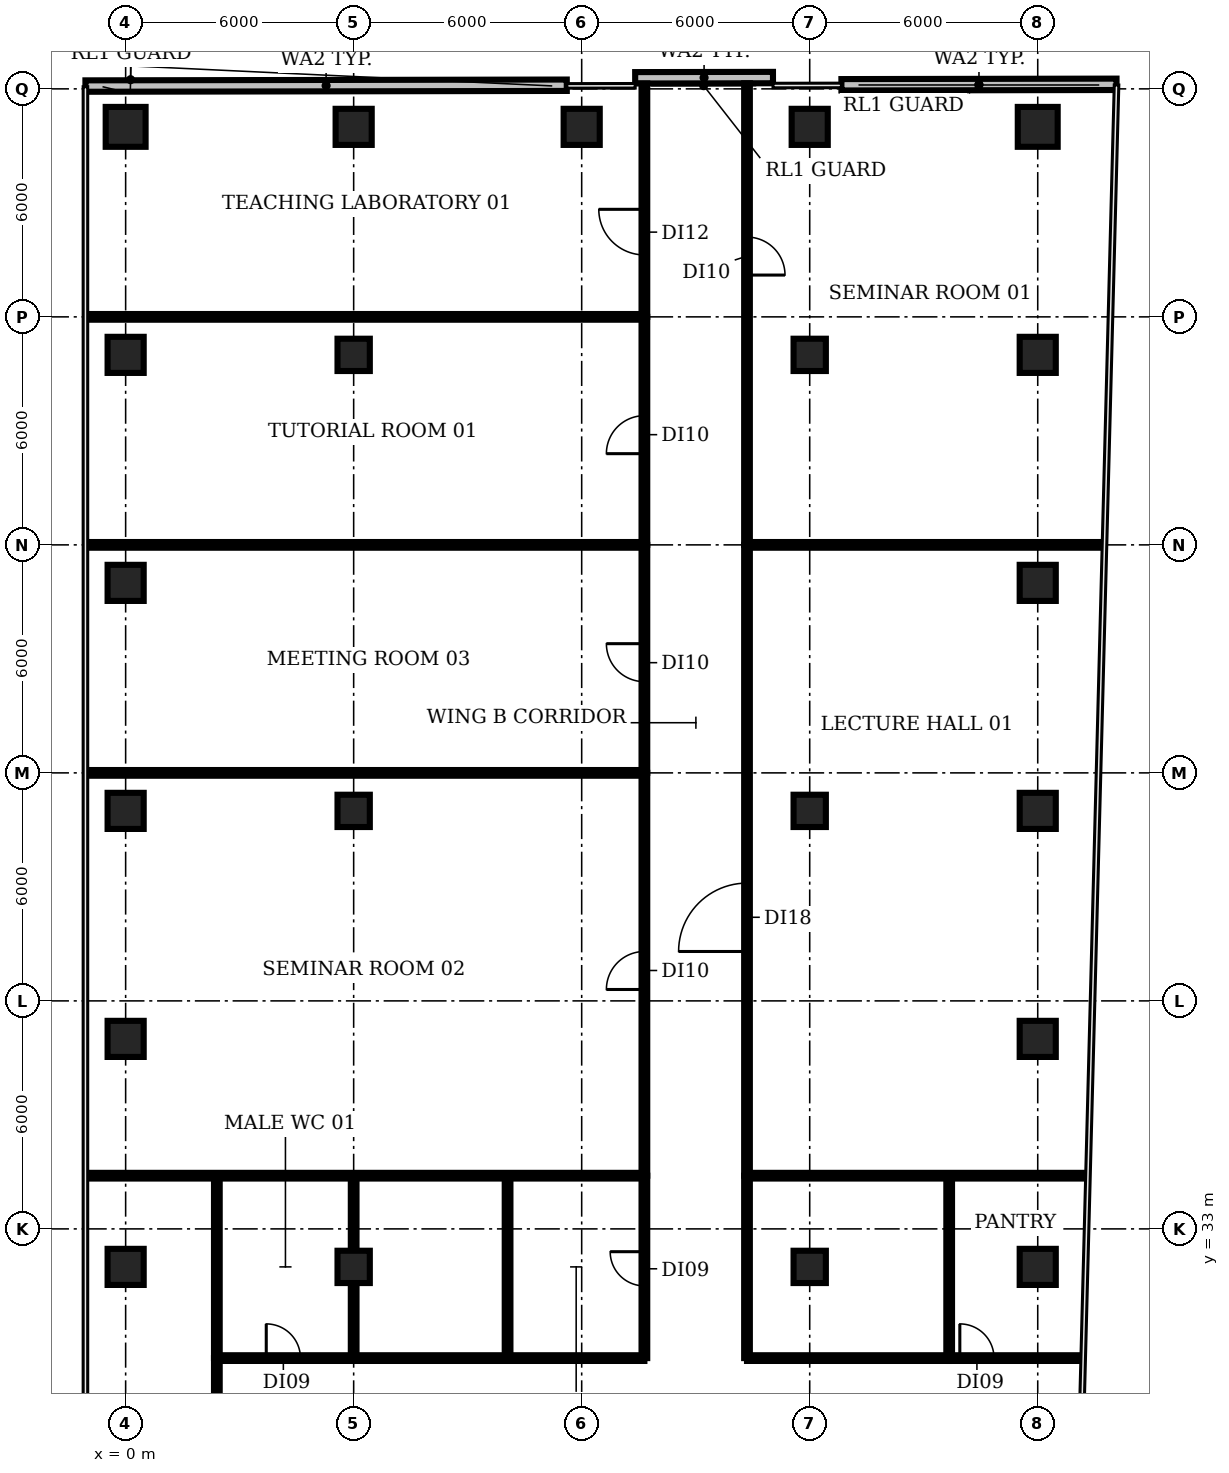
"""IFC4 building model, lengths in metres.
Left out: names, types, materials, properties, quantities, classifications, styles, units other than length and angle.
Written with IfcOpenShell. Run it as: python <this file> out.ifc"""

import sys

from ifc_helpers import new_model, si_unit, direction, frame, frame_2d, origin, origin_2d, place, context, subcontext, project, spatial, rectangle, circle, extrude, element, fill, save


model = new_model("IFC4")
c1 = context("Model", 3, precision=1e-05, world=origin(), true_north=direction((0.0, 1.0)))
c2 = subcontext(c1, "Body", "Model", "MODEL_VIEW")
j1 = project(units=[si_unit("LENGTHUNIT", "METRE"), si_unit("PLANEANGLEUNIT", "RADIAN")], contexts=[c1])
p1 = place(None, origin())
s1 = spatial("IfcSite", under=j1, at=p1, CompositionType="ELEMENT")
p2 = place(p1, origin())
s2 = spatial("IfcBuilding", under=s1, at=p2, CompositionType="ELEMENT")
p3 = place(p2, frame((0.0, 0.0, 45.8)))
s3 = spatial("IfcBuildingStorey", under=s2, at=p3, CompositionType="ELEMENT", Elevation=45.8)
for number, where, z_axis, x_axis in (
    (1, (0.0, 32.0, 0.0), (0.0, 0.0, 1.0), (1.0, 0.0, 0.0)),
    (2, (0.0, 38.0, 0.0), (0.0, 0.0, 1.0), (1.0, 0.0, 0.0)),
    (3, (0.0, 44.0, 0.0), (0.0, 0.0, 1.0), (1.0, 0.0, 0.0)),
    (4, (0.0, 50.0, 0.0), (0.0, 0.0, 1.0), (1.0, 0.0, 0.0)),
    (5, (0.0, 56.0, 0.0), (0.0, 0.0, 1.0), (1.0, 0.0, 0.0)),
):
    element("IfcColumn", number, at=place(p3, frame(where, z_axis=z_axis, x_axis=x_axis)), inside=s3, PredefinedType="COLUMN", context=c2, shape_type="SweptSolid", body=[
        extrude(rectangle(XDim=0.95, YDim=0.95, at=origin_2d()), origin(), (0.0, 0.0, 1.0), 3.85),
    ])
p4 = place(p3, frame((0.0, 62.0, 0.0), z_axis=(0.0, 0.0, 1.0), x_axis=(1.0, 0.0, 0.0)))
e6 = element("IfcColumn", 6, at=p4, inside=s3, PredefinedType="COLUMN", context=c2, shape_type="SweptSolid", body=[
    extrude(circle(Radius=0.525, at=origin_2d()), origin(), (0.0, 0.0, 1.0), 3.85),
])
for number, where, z_axis, x_axis in (
    (7, (6.0, 32.0, 0.0), (0.0, 0.0, 1.0), (1.0, 0.0, 0.0)),
    (8, (6.0, 44.0, 0.0), (0.0, 0.0, 1.0), (1.0, 0.0, 0.0)),
    (9, (6.0, 56.0, 0.0), (0.0, 0.0, 1.0), (1.0, 0.0, 0.0)),
):
    element("IfcColumn", number, at=place(p3, frame(where, z_axis=z_axis, x_axis=x_axis)), inside=s3, PredefinedType="COLUMN", context=c2, shape_type="SweptSolid", body=[
        extrude(rectangle(XDim=0.85, YDim=0.85, at=origin_2d()), origin(), (0.0, 0.0, 1.0), 3.85),
    ])
for number, where, z_axis, x_axis in (
    (10, (6.0, 62.0, 0.0), (0.0, 0.0, 1.0), (1.0, 0.0, 0.0)),
    (11, (12.0, 62.0, 0.0), (0.0, 0.0, 1.0), (1.0, 0.0, 0.0)),
):
    element("IfcColumn", number, at=place(p3, frame(where, z_axis=z_axis, x_axis=x_axis)), inside=s3, PredefinedType="COLUMN", context=c2, shape_type="SweptSolid", body=[
        extrude(rectangle(XDim=0.95, YDim=0.95, at=origin_2d()), origin(), (0.0, 0.0, 1.0), 3.85),
    ])
for number, where, z_axis, x_axis in (
    (12, (18.0, 32.0, 0.0), (0.0, 0.0, 1.0), (1.0, 0.0, 0.0)),
    (13, (18.0, 44.0, 0.0), (0.0, 0.0, 1.0), (1.0, 0.0, 0.0)),
    (14, (18.0, 56.0, 0.0), (0.0, 0.0, 1.0), (1.0, 0.0, 0.0)),
):
    element("IfcColumn", number, at=place(p3, frame(where, z_axis=z_axis, x_axis=x_axis)), inside=s3, PredefinedType="COLUMN", context=c2, shape_type="SweptSolid", body=[
        extrude(rectangle(XDim=0.85, YDim=0.85, at=origin_2d()), origin(), (0.0, 0.0, 1.0), 3.85),
    ])
for number, where, z_axis, x_axis in (
    (15, (18.0, 62.0, 0.0), (0.0, 0.0, 1.0), (1.0, 0.0, 0.0)),
    (16, (24.0, 32.0, 0.0), (0.0, 0.0, 1.0), (1.0, 0.0, 0.0)),
    (17, (24.0, 38.0, 0.0), (0.0, 0.0, 1.0), (1.0, 0.0, 0.0)),
    (18, (24.0, 44.0, 0.0), (0.0, 0.0, 1.0), (1.0, 0.0, 0.0)),
    (19, (24.0, 50.0, 0.0), (0.0, 0.0, 1.0), (1.0, 0.0, 0.0)),
    (20, (24.0, 56.0, 0.0), (0.0, 0.0, 1.0), (1.0, 0.0, 0.0)),
):
    element("IfcColumn", number, at=place(p3, frame(where, z_axis=z_axis, x_axis=x_axis)), inside=s3, PredefinedType="COLUMN", context=c2, shape_type="SweptSolid", body=[
        extrude(rectangle(XDim=0.95, YDim=0.95, at=origin_2d()), origin(), (0.0, 0.0, 1.0), 3.85),
    ])
p5 = place(p3, frame((24.0, 62.0, 0.0), z_axis=(0.0, 0.0, 1.0), x_axis=(1.0, 0.0, 0.0)))
e21 = element("IfcColumn", 21, at=p5, inside=s3, PredefinedType="COLUMN", context=c2, shape_type="SweptSolid", body=[
    extrude(circle(Radius=0.525, at=origin_2d()), origin(), (0.0, 0.0, 1.0), 3.85),
])
p6 = place(p3, frame((26.074, 63.12, 0.0), z_axis=(0.0, 0.0, 1.0), x_axis=(-0.999998578418, -0.001686167636, 0.0)))
e22 = element("IfcWall", 22, at=p6, inside=s3, PredefinedType="SOLIDWALL", context=c2, shape_type="SweptSolid", body=[
    extrude(rectangle(XDim=7.24, YDim=0.3, at=frame_2d((3.62, 0.0))), origin(), (0.0, 0.0, 1.0), 3.85),
])
p7 = place(p3, frame((17.034, 63.297, 0.0), z_axis=(0.0, 0.0, 1.0), x_axis=(-0.999998583486, -0.001683159267, 0.0)))
e23 = element("IfcWall", 23, at=p7, inside=s3, PredefinedType="SOLIDWALL", context=c2, shape_type="SweptSolid", body=[
    extrude(rectangle(XDim=3.626, YDim=0.3, at=frame_2d((1.813, 0.0))), origin(), (0.0, 0.0, 1.0), 3.85),
])
p8 = place(p3, frame((11.608, 63.095, 0.0), z_axis=(0.0, 0.0, 1.0), x_axis=(-0.999998561418, -0.001696219611, 0.0)))
e24 = element("IfcWall", 24, at=p8, inside=s3, PredefinedType="SOLIDWALL", context=c2, shape_type="SweptSolid", body=[
    extrude(rectangle(XDim=12.666, YDim=0.3, at=frame_2d((6.333, 0.0))), origin(), (0.0, 0.0, 1.0), 3.85),
])
for number, where, z_axis, x_axis in (
    (25, (-1.01, 34.4, 0.0), (0.0, 0.0, 1.0), (1.0, 0.0, 0.0)),
    (26, (-1.01, 45.0, 0.0), (0.0, 0.0, 1.0), (1.0, 0.0, 0.0)),
    (27, (-1.01, 51.0, 0.0), (0.0, 0.0, 1.0), (1.0, 0.0, 0.0)),
    (28, (-1.01, 57.0, 0.0), (0.0, 0.0, 1.0), (1.0, 0.0, 0.0)),
):
    element("IfcWall", number, at=place(p3, frame(where, z_axis=z_axis, x_axis=x_axis)), inside=s3, PredefinedType="PARTITIONING", context=c2, shape_type="SweptSolid", body=[
        extrude(rectangle(XDim=14.66, YDim=0.15, at=frame_2d((7.33, 0.0))), origin(), (0.0, 0.0, 1.0), 2.83),
    ])
p9 = place(p3, frame((2.4, 25.7, 0.0), z_axis=(0.0, 0.0, 1.0), x_axis=(0.0, 1.0, 0.0)))
e29 = element("IfcWall", 29, at=p9, inside=s3, PredefinedType="PARTITIONING", context=c2, shape_type="SweptSolid", body=[
    extrude(rectangle(XDim=3.9, YDim=0.15, at=frame_2d((1.95, 0.0))), origin(), (0.0, 0.0, 1.0), 2.83),
])
p10 = place(p3, frame((2.4, 29.6, 0.0), z_axis=(0.0, 0.0, 1.0), x_axis=(0.0, 1.0, 0.0)))
e30 = element("IfcWall", 30, at=p10, inside=s3, PredefinedType="PARTITIONING", context=c2, shape_type="SweptSolid", body=[
    extrude(rectangle(XDim=4.8, YDim=0.15, at=frame_2d((2.4, 0.0))), origin(), (0.0, 0.0, 1.0), 2.83),
])
p11 = place(p3, frame((2.4, 29.6, 0.0), z_axis=(0.0, 0.0, 1.0), x_axis=(1.0, 0.0, 0.0)))
e31 = element("IfcWall", 31, at=p11, inside=s3, PredefinedType="PARTITIONING", context=c2, shape_type="SweptSolid", body=[
    extrude(rectangle(XDim=3.6, YDim=0.15, at=frame_2d((1.8, 0.0))), origin(), (0.0, 0.0, 1.0), 2.83),
])
p12 = place(p11, frame((1.3, 0.0, 0.0)))
e32 = element("IfcOpeningElement", 32, at=p12, cuts=e31, PredefinedType="OPENING", context=c2, shape_type="SweptSolid", body=[
    extrude(rectangle(XDim=0.9, YDim=2.1, at=frame_2d((0.45, 1.05))), frame((0.0, 0.085, 0.0), z_axis=(0.0, -1.0, 0.0), x_axis=(1.0, 0.0, 0.0)), (0.0, 0.0, 1.0), 0.17),
])
p13 = place(p3, frame((6.0, 29.6, 0.0), z_axis=(0.0, 0.0, 1.0), x_axis=(0.0, 1.0, 0.0)))
e33 = element("IfcWall", 33, at=p13, inside=s3, PredefinedType="PARTITIONING", context=c2, shape_type="SweptSolid", body=[
    extrude(rectangle(XDim=4.8, YDim=0.15, at=frame_2d((2.4, 0.0))), origin(), (0.0, 0.0, 1.0), 2.83),
])
p14 = place(p3, frame((6.0, 29.6, 0.0), z_axis=(0.0, 0.0, 1.0), x_axis=(1.0, 0.0, 0.0)))
e34 = element("IfcWall", 34, at=p14, inside=s3, PredefinedType="PARTITIONING", context=c2, shape_type="SweptSolid", body=[
    extrude(rectangle(XDim=7.65, YDim=0.15, at=frame_2d((3.825, 0.0))), origin(), (0.0, 0.0, 1.0), 2.83),
])
p15 = place(p3, frame((10.05, 29.6, 0.0), z_axis=(0.0, 0.0, 1.0), x_axis=(0.0, 1.0, 0.0)))
e35 = element("IfcWall", 35, at=p15, inside=s3, PredefinedType="PARTITIONING", context=c2, shape_type="SweptSolid", body=[
    extrude(rectangle(XDim=4.8, YDim=0.15, at=frame_2d((2.4, 0.0))), origin(), (0.0, 0.0, 1.0), 2.83),
])
p16 = place(p3, frame((13.65, 29.6, 0.0), z_axis=(0.0, 0.0, 1.0), x_axis=(0.0, 1.0, 0.0)))
e36 = element("IfcWall", 36, at=p16, inside=s3, PredefinedType="PARTITIONING", context=c2, shape_type="SweptSolid", body=[
    extrude(rectangle(XDim=4.8, YDim=0.15, at=frame_2d((2.4, 0.0))), origin(), (0.0, 0.0, 1.0), 2.83),
])
p17 = place(p16, frame((1.9, 0.0, 0.0)))
e37 = element("IfcOpeningElement", 37, at=p17, cuts=e36, PredefinedType="OPENING", context=c2, shape_type="SweptSolid", body=[
    extrude(rectangle(XDim=0.9, YDim=2.1, at=frame_2d((0.45, 1.05))), frame((0.0, 0.085, 0.0), z_axis=(0.0, -1.0, 0.0), x_axis=(1.0, 0.0, 0.0)), (0.0, 0.0, 1.0), 0.17),
])
p18 = place(p3, frame((13.65, 34.4, 0.0), z_axis=(0.0, 0.0, 1.0), x_axis=(0.0, 1.0, 0.0)))
e38 = element("IfcWall", 38, at=p18, inside=s3, PredefinedType="PARTITIONING", context=c2, shape_type="SweptSolid", body=[
    extrude(rectangle(XDim=10.6, YDim=0.15, at=frame_2d((5.3, 0.0))), origin(), (0.0, 0.0, 1.0), 2.83),
])
p19 = place(p18, frame((4.9, 0.0, 0.0)))
e39 = element("IfcOpeningElement", 39, at=p19, cuts=e38, PredefinedType="OPENING", context=c2, shape_type="SweptSolid", body=[
    extrude(rectangle(XDim=1.0, YDim=2.1, at=frame_2d((0.5, 1.05))), frame((0.0, 0.085, 0.0), z_axis=(0.0, -1.0, 0.0), x_axis=(1.0, 0.0, 0.0)), (0.0, 0.0, 1.0), 0.17),
])
p20 = place(p3, frame((13.65, 45.0, 0.0), z_axis=(0.0, 0.0, 1.0), x_axis=(0.0, 1.0, 0.0)))
e40 = element("IfcWall", 40, at=p20, inside=s3, PredefinedType="PARTITIONING", context=c2, shape_type="SweptSolid", body=[
    extrude(rectangle(XDim=6.0, YDim=0.15, at=frame_2d((3.0, 0.0))), origin(), (0.0, 0.0, 1.0), 2.83),
])
p21 = place(p20, frame((2.4, 0.0, 0.0)))
e41 = element("IfcOpeningElement", 41, at=p21, cuts=e40, PredefinedType="OPENING", context=c2, shape_type="SweptSolid", body=[
    extrude(rectangle(XDim=1.0, YDim=2.1, at=frame_2d((0.5, 1.05))), frame((0.0, 0.085, 0.0), z_axis=(0.0, -1.0, 0.0), x_axis=(1.0, 0.0, 0.0)), (0.0, 0.0, 1.0), 0.17),
])
p22 = place(p3, frame((13.65, 51.0, 0.0), z_axis=(0.0, 0.0, 1.0), x_axis=(0.0, 1.0, 0.0)))
e42 = element("IfcWall", 42, at=p22, inside=s3, PredefinedType="PARTITIONING", context=c2, shape_type="SweptSolid", body=[
    extrude(rectangle(XDim=6.0, YDim=0.15, at=frame_2d((3.0, 0.0))), origin(), (0.0, 0.0, 1.0), 2.83),
])
p23 = place(p22, frame((2.4, 0.0, 0.0)))
e43 = element("IfcOpeningElement", 43, at=p23, cuts=e42, PredefinedType="OPENING", context=c2, shape_type="SweptSolid", body=[
    extrude(rectangle(XDim=1.0, YDim=2.1, at=frame_2d((0.5, 1.05))), frame((0.0, 0.085, 0.0), z_axis=(0.0, -1.0, 0.0), x_axis=(1.0, 0.0, 0.0)), (0.0, 0.0, 1.0), 0.17),
])
p24 = place(p3, frame((13.65, 57.0, 0.0), z_axis=(0.0, 0.0, 1.0), x_axis=(0.0, 1.0, 0.0)))
e44 = element("IfcWall", 44, at=p24, inside=s3, PredefinedType="PARTITIONING", context=c2, shape_type="SweptSolid", body=[
    extrude(rectangle(XDim=6.141, YDim=0.15, at=frame_2d((3.071, 0.0))), origin(), (0.0, 0.0, 1.0), 2.83),
])
p25 = place(p24, frame((1.63, 0.0, 0.0)))
e45 = element("IfcOpeningElement", 45, at=p25, cuts=e44, PredefinedType="OPENING", context=c2, shape_type="SweptSolid", body=[
    extrude(rectangle(XDim=1.2, YDim=2.1, at=frame_2d((0.6, 1.05))), frame((0.0, 0.085, 0.0), z_axis=(0.0, -1.0, 0.0), x_axis=(1.0, 0.0, 0.0)), (0.0, 0.0, 1.0), 0.17),
])
p26 = place(p3, frame((16.35, 29.6, 0.0), z_axis=(0.0, 0.0, 1.0), x_axis=(0.0, 1.0, 0.0)))
e46 = element("IfcWall", 46, at=p26, inside=s3, PredefinedType="PARTITIONING", context=c2, shape_type="SweptSolid", body=[
    extrude(rectangle(XDim=4.8, YDim=0.15, at=frame_2d((2.4, 0.0))), origin(), (0.0, 0.0, 1.0), 2.83),
])
p27 = place(p3, frame((16.35, 29.6, 0.0), z_axis=(0.0, 0.0, 1.0), x_axis=(1.0, 0.0, 0.0)))
e47 = element("IfcWall", 47, at=p27, inside=s3, PredefinedType="PARTITIONING", context=c2, shape_type="SweptSolid", body=[
    extrude(rectangle(XDim=5.32, YDim=0.15, at=frame_2d((2.66, 0.0))), origin(), (0.0, 0.0, 1.0), 2.83),
])
p28 = place(p3, frame((16.35, 34.4, 0.0), z_axis=(0.0, 0.0, 1.0), x_axis=(0.0, 1.0, 0.0)))
e48 = element("IfcWall", 48, at=p28, inside=s3, PredefinedType="PARTITIONING", context=c2, shape_type="SweptSolid", body=[
    extrude(rectangle(XDim=16.6, YDim=0.15, at=frame_2d((8.3, 0.0))), origin(), (0.0, 0.0, 1.0), 2.83),
])
p29 = place(p28, frame((5.9, 0.0, 0.0)))
e49 = element("IfcOpeningElement", 49, at=p29, cuts=e48, PredefinedType="OPENING", context=c2, shape_type="SweptSolid", body=[
    extrude(rectangle(XDim=1.8, YDim=2.1, at=frame_2d((0.9, 1.05))), frame((0.0, 0.085, 0.0), z_axis=(0.0, -1.0, 0.0), x_axis=(1.0, 0.0, 0.0)), (0.0, 0.0, 1.0), 0.17),
])
p30 = place(p3, frame((16.35, 34.4, 0.0), z_axis=(0.0, 0.0, 1.0), x_axis=(1.0, 0.0, 0.0)))
e50 = element("IfcWall", 50, at=p30, inside=s3, PredefinedType="PARTITIONING", context=c2, shape_type="SweptSolid", body=[
    extrude(rectangle(XDim=8.92, YDim=0.15, at=frame_2d((4.46, 0.0))), origin(), (0.0, 0.0, 1.0), 2.83),
])
p31 = place(p3, frame((16.35, 51.0, 0.0), z_axis=(0.0, 0.0, 1.0), x_axis=(1.0, 0.0, 0.0)))
e51 = element("IfcWall", 51, at=p31, inside=s3, PredefinedType="PARTITIONING", context=c2, shape_type="SweptSolid", body=[
    extrude(rectangle(XDim=9.339, YDim=0.15, at=frame_2d((4.669, 0.0))), origin(), (0.0, 0.0, 1.0), 2.83),
])
p32 = place(p3, frame((16.35, 63.146, 0.0), z_axis=(0.0, 0.0, 1.0), x_axis=(0.0, -1.0, 0.0)))
e52 = element("IfcWall", 52, at=p32, inside=s3, PredefinedType="PARTITIONING", context=c2, shape_type="SweptSolid", body=[
    extrude(rectangle(XDim=12.146, YDim=0.15, at=frame_2d((6.073, 0.0))), origin(), (0.0, 0.0, 1.0), 2.83),
])
p33 = place(p32, frame((4.046, 0.0, 0.0)))
e53 = element("IfcOpeningElement", 53, at=p33, cuts=e52, PredefinedType="OPENING", context=c2, shape_type="SweptSolid", body=[
    extrude(rectangle(XDim=1.0, YDim=2.1, at=frame_2d((0.5, 1.05))), frame((0.0, 0.085, 0.0), z_axis=(0.0, -1.0, 0.0), x_axis=(1.0, 0.0, 0.0)), (0.0, 0.0, 1.0), 0.17),
])
p34 = place(p3, frame((21.67, 29.6, 0.0), z_axis=(0.0, 0.0, 1.0), x_axis=(0.0, 1.0, 0.0)))
e54 = element("IfcWall", 54, at=p34, inside=s3, PredefinedType="PARTITIONING", context=c2, shape_type="SweptSolid", body=[
    extrude(rectangle(XDim=4.8, YDim=0.15, at=frame_2d((2.4, 0.0))), origin(), (0.0, 0.0, 1.0), 2.83),
])
p35 = place(p3, frame((21.67, 29.6, 0.0), z_axis=(0.0, 0.0, 1.0), x_axis=(1.0, 0.0, 0.0)))
e55 = element("IfcWall", 55, at=p35, inside=s3, PredefinedType="PARTITIONING", context=c2, shape_type="SweptSolid", body=[
    extrude(rectangle(XDim=3.48, YDim=0.15, at=frame_2d((1.74, 0.0))), origin(), (0.0, 0.0, 1.0), 2.83),
])
p36 = place(p35, frame((0.28, 0.0, 0.0)))
e56 = element("IfcOpeningElement", 56, at=p36, cuts=e55, PredefinedType="OPENING", context=c2, shape_type="SweptSolid", body=[
    extrude(rectangle(XDim=0.9, YDim=2.1, at=frame_2d((0.45, 1.05))), frame((0.0, 0.085, 0.0), z_axis=(0.0, -1.0, 0.0), x_axis=(1.0, 0.0, 0.0)), (0.0, 0.0, 1.0), 0.17),
])
p37 = place(p12, origin())
e57 = element("IfcDoor", 57, at=p37, inside=s3, OperationType="SINGLE_SWING_LEFT", PredefinedType="DOOR", context=c2, shape_type="SweptSolid", body=[
    extrude(rectangle(XDim=0.9, YDim=2.1, at=frame_2d((0.45, 1.05))), frame((0.0, 0.025, 0.0), z_axis=(0.0, -1.0, 0.0), x_axis=(1.0, 0.0, 0.0)), (0.0, 0.0, 1.0), 0.05),
])
fill(e32, e57)
p38 = place(p17, origin())
e58 = element("IfcDoor", 58, at=p38, inside=s3, OperationType="SINGLE_SWING_RIGHT", PredefinedType="DOOR", context=c2, shape_type="SweptSolid", body=[
    extrude(rectangle(XDim=0.9, YDim=2.1, at=frame_2d((0.45, 1.05))), frame((0.0, 0.025, 0.0), z_axis=(0.0, -1.0, 0.0), x_axis=(1.0, 0.0, 0.0)), (0.0, 0.0, 1.0), 0.05),
])
fill(e37, e58)
p39 = place(p19, origin())
e59 = element("IfcDoor", 59, at=p39, inside=s3, OperationType="SINGLE_SWING_LEFT", PredefinedType="DOOR", context=c2, shape_type="SweptSolid", body=[
    extrude(rectangle(XDim=1.0, YDim=2.1, at=frame_2d((0.5, 1.05))), frame((0.0, 0.025, 0.0), z_axis=(0.0, -1.0, 0.0), x_axis=(1.0, 0.0, 0.0)), (0.0, 0.0, 1.0), 0.05),
])
fill(e39, e59)
p40 = place(p21, origin())
e60 = element("IfcDoor", 60, at=p40, inside=s3, OperationType="SINGLE_SWING_RIGHT", PredefinedType="DOOR", context=c2, shape_type="SweptSolid", body=[
    extrude(rectangle(XDim=1.0, YDim=2.1, at=frame_2d((0.5, 1.05))), frame((0.0, 0.025, 0.0), z_axis=(0.0, -1.0, 0.0), x_axis=(1.0, 0.0, 0.0)), (0.0, 0.0, 1.0), 0.05),
])
fill(e41, e60)
p41 = place(p23, origin())
e61 = element("IfcDoor", 61, at=p41, inside=s3, OperationType="SINGLE_SWING_LEFT", PredefinedType="DOOR", context=c2, shape_type="SweptSolid", body=[
    extrude(rectangle(XDim=1.0, YDim=2.1, at=frame_2d((0.5, 1.05))), frame((0.0, 0.025, 0.0), z_axis=(0.0, -1.0, 0.0), x_axis=(1.0, 0.0, 0.0)), (0.0, 0.0, 1.0), 0.05),
])
fill(e43, e61)
p42 = place(p25, origin())
e62 = element("IfcDoor", 62, at=p42, inside=s3, OperationType="SINGLE_SWING_RIGHT", PredefinedType="DOOR", context=c2, shape_type="SweptSolid", body=[
    extrude(rectangle(XDim=1.2, YDim=2.1, at=frame_2d((0.6, 1.05))), frame((0.0, 0.025, 0.0), z_axis=(0.0, -1.0, 0.0), x_axis=(1.0, 0.0, 0.0)), (0.0, 0.0, 1.0), 0.05),
])
fill(e45, e62)
p43 = place(p29, origin())
e63 = element("IfcDoor", 63, at=p43, inside=s3, OperationType="SINGLE_SWING_LEFT", PredefinedType="DOOR", context=c2, shape_type="SweptSolid", body=[
    extrude(rectangle(XDim=1.8, YDim=2.1, at=frame_2d((0.9, 1.05))), frame((0.0, 0.025, 0.0), z_axis=(0.0, -1.0, 0.0), x_axis=(1.0, 0.0, 0.0)), (0.0, 0.0, 1.0), 0.05),
])
fill(e49, e63)
p44 = place(p33, origin())
e64 = element("IfcDoor", 64, at=p44, inside=s3, OperationType="SINGLE_SWING_RIGHT", PredefinedType="DOOR", context=c2, shape_type="SweptSolid", body=[
    extrude(rectangle(XDim=1.0, YDim=2.1, at=frame_2d((0.5, 1.05))), frame((0.0, 0.025, 0.0), z_axis=(0.0, -1.0, 0.0), x_axis=(1.0, 0.0, 0.0)), (0.0, 0.0, 1.0), 0.05),
])
fill(e53, e64)
p45 = place(p36, origin())
e65 = element("IfcDoor", 65, at=p45, inside=s3, OperationType="SINGLE_SWING_LEFT", PredefinedType="DOOR", context=c2, shape_type="SweptSolid", body=[
    extrude(rectangle(XDim=0.9, YDim=2.1, at=frame_2d((0.45, 1.05))), frame((0.0, 0.025, 0.0), z_axis=(0.0, -1.0, 0.0), x_axis=(1.0, 0.0, 0.0)), (0.0, 0.0, 1.0), 0.05),
])
fill(e56, e65)
save(model, sys.argv[1])
